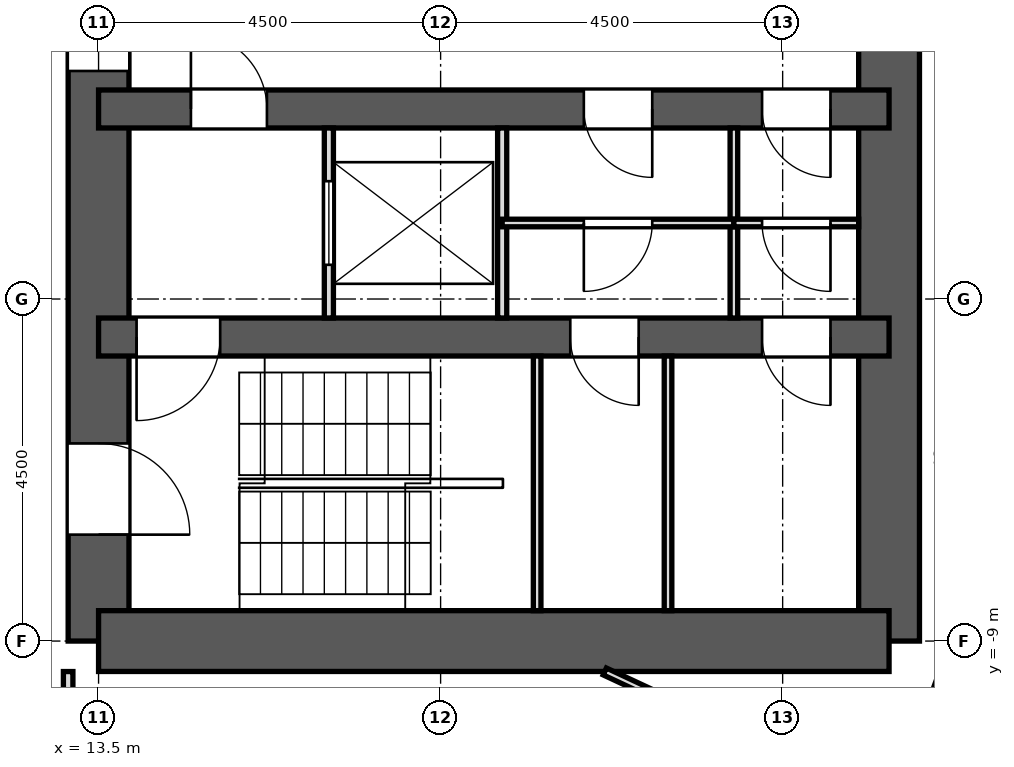
"""IFC4 building model, lengths in metres.
Left out: names, types, materials, properties, quantities, classifications, styles, units other than length and angle.
Written with IfcOpenShell. Run it as: python <this file> out.ifc"""

import sys

from ifc_helpers import new_model, si_unit, direction, frame, frame_2d, origin, place, context, subcontext, project, spatial, rectangle, extrude, element, fill, save


model = new_model("IFC4")
c1 = context("Model", 3, precision=1e-05, world=origin(), true_north=direction((0.0, 1.0)))
c2 = subcontext(c1, "Body", "Model", "MODEL_VIEW")
j1 = project(units=[si_unit("LENGTHUNIT", "METRE"), si_unit("PLANEANGLEUNIT", "RADIAN")], contexts=[c1])
p1 = place(None, origin())
s1 = spatial("IfcSite", under=j1, at=p1, CompositionType="ELEMENT")
p2 = place(p1, origin())
s2 = spatial("IfcBuilding", under=s1, at=p2, CompositionType="ELEMENT")
p3 = place(p2, frame((0.0, 0.0, 141.4)))
s3 = spatial("IfcBuildingStorey", under=s2, at=p3, CompositionType="ELEMENT", Elevation=141.4)
p4 = place(p3, frame((13.5, -9.0, 0.0), z_axis=(0.0, 0.0, 1.0), x_axis=(0.0, 1.0, 0.0)))
e1 = element("IfcWall", 1, at=p4, inside=s3, PredefinedType="SHEAR", context=c2, shape_type="SweptSolid", body=[
    extrude(rectangle(XDim=18.0, YDim=0.8, at=frame_2d((9.0, 0.0))), origin(), (0.0, 0.0, 1.0), 3.3),
])
p5 = place(p4, frame((15.4, 0.0, 0.0)))
e2 = element("IfcOpeningElement", 2, at=p5, cuts=e1, PredefinedType="OPENING", context=c2, shape_type="SweptSolid", body=[
    extrude(rectangle(XDim=1.2, YDim=2.1, at=frame_2d((0.6, 1.05))), frame((0.0, 0.412, 0.0), z_axis=(0.0, -1.0, 0.0), x_axis=(1.0, 0.0, 0.0)), (0.0, 0.0, 1.0), 0.824),
])
p6 = place(p4, frame((1.4, 0.0, 0.0)))
e3 = element("IfcOpeningElement", 3, at=p6, cuts=e1, PredefinedType="OPENING", context=c2, shape_type="SweptSolid", body=[
    extrude(rectangle(XDim=1.2, YDim=2.1, at=frame_2d((0.6, 1.05))), frame((0.0, 0.412, 0.0), z_axis=(0.0, -1.0, 0.0), x_axis=(1.0, 0.0, 0.0)), (0.0, 0.0, 1.0), 0.824),
])
p7 = place(p4, frame((7.5, 0.0, 0.0)))
e4 = element("IfcOpeningElement", 4, at=p7, cuts=e1, PredefinedType="OPENING", context=c2, shape_type="SweptSolid", body=[
    extrude(rectangle(XDim=3.0, YDim=2.4, at=frame_2d((1.5, 1.2))), frame((0.0, 0.412, 0.0), z_axis=(0.0, -1.0, 0.0), x_axis=(1.0, 0.0, 0.0)), (0.0, 0.0, 1.0), 0.824),
])
p8 = place(p3, frame((23.9, -9.0, 0.0), z_axis=(0.0, 0.0, 1.0), x_axis=(0.0, 1.0, 0.0)))
e5 = element("IfcWall", 5, at=p8, inside=s3, PredefinedType="SHEAR", context=c2, shape_type="SweptSolid", body=[
    extrude(rectangle(XDim=18.0, YDim=0.8, at=frame_2d((9.0, 0.0))), origin(), (0.0, 0.0, 1.0), 3.3),
])
p9 = place(p3, frame((13.5, -9.0, 0.0), z_axis=(0.0, 0.0, 1.0), x_axis=(1.0, 0.0, 0.0)))
e6 = element("IfcWall", 6, at=p9, inside=s3, PredefinedType="SHEAR", context=c2, shape_type="SweptSolid", body=[
    extrude(rectangle(XDim=10.4, YDim=0.8, at=frame_2d((5.2, 0.0))), origin(), (0.0, 0.0, 1.0), 3.3),
])
p10 = place(p3, frame((13.5, -5.0, 0.0), z_axis=(0.0, 0.0, 1.0), x_axis=(1.0, 0.0, 0.0)))
e7 = element("IfcWall", 7, at=p10, inside=s3, PredefinedType="SHEAR", context=c2, shape_type="SweptSolid", body=[
    extrude(rectangle(XDim=10.4, YDim=0.5, at=frame_2d((5.2, 0.0))), origin(), (0.0, 0.0, 1.0), 3.3),
])
p11 = place(p10, frame((6.206, 0.0, 0.0)))
e8 = element("IfcOpeningElement", 8, at=p11, cuts=e7, PredefinedType="OPENING", context=c2, shape_type="SweptSolid", body=[
    extrude(rectangle(XDim=0.9, YDim=2.1, at=frame_2d((0.45, 1.05))), frame((0.0, 0.262, 0.0), z_axis=(0.0, -1.0, 0.0), x_axis=(1.0, 0.0, 0.0)), (0.0, 0.0, 1.0), 0.524),
])
p12 = place(p10, frame((8.729, 0.0, 0.0)))
e9 = element("IfcOpeningElement", 9, at=p12, cuts=e7, PredefinedType="OPENING", context=c2, shape_type="SweptSolid", body=[
    extrude(rectangle(XDim=0.9, YDim=2.1, at=frame_2d((0.45, 1.05))), frame((0.0, 0.262, 0.0), z_axis=(0.0, -1.0, 0.0), x_axis=(1.0, 0.0, 0.0)), (0.0, 0.0, 1.0), 0.524),
])
p13 = place(p10, frame((0.5, 0.0, 0.0)))
e10 = element("IfcOpeningElement", 10, at=p13, cuts=e7, PredefinedType="OPENING", context=c2, shape_type="SweptSolid", body=[
    extrude(rectangle(XDim=1.1, YDim=2.1, at=frame_2d((0.55, 1.05))), frame((0.0, 0.262, 0.0), z_axis=(0.0, -1.0, 0.0), x_axis=(1.0, 0.0, 0.0)), (0.0, 0.0, 1.0), 0.524),
])
p14 = place(p3, frame((13.5, -2.0, 0.0), z_axis=(0.0, 0.0, 1.0), x_axis=(1.0, 0.0, 0.0)))
e11 = element("IfcWall", 11, at=p14, inside=s3, PredefinedType="SHEAR", context=c2, shape_type="SweptSolid", body=[
    extrude(rectangle(XDim=10.4, YDim=0.5, at=frame_2d((5.2, 0.0))), origin(), (0.0, 0.0, 1.0), 3.3),
])
p15 = place(p14, frame((1.215, 0.0, 0.0)))
e12 = element("IfcOpeningElement", 12, at=p15, cuts=e11, PredefinedType="OPENING", context=c2, shape_type="SweptSolid", body=[
    extrude(rectangle(XDim=1.0, YDim=2.1, at=frame_2d((0.5, 1.05))), frame((0.0, 0.262, 0.0), z_axis=(0.0, -1.0, 0.0), x_axis=(1.0, 0.0, 0.0)), (0.0, 0.0, 1.0), 0.524),
])
p16 = place(p14, frame((6.384, 0.0, 0.0)))
e13 = element("IfcOpeningElement", 13, at=p16, cuts=e11, PredefinedType="OPENING", context=c2, shape_type="SweptSolid", body=[
    extrude(rectangle(XDim=0.9, YDim=2.1, at=frame_2d((0.45, 1.05))), frame((0.0, 0.262, 0.0), z_axis=(0.0, -1.0, 0.0), x_axis=(1.0, 0.0, 0.0)), (0.0, 0.0, 1.0), 0.524),
])
p17 = place(p14, frame((8.729, 0.0, 0.0)))
e14 = element("IfcOpeningElement", 14, at=p17, cuts=e11, PredefinedType="OPENING", context=c2, shape_type="SweptSolid", body=[
    extrude(rectangle(XDim=0.9, YDim=2.1, at=frame_2d((0.45, 1.05))), frame((0.0, 0.262, 0.0), z_axis=(0.0, -1.0, 0.0), x_axis=(1.0, 0.0, 0.0)), (0.0, 0.0, 1.0), 0.524),
])
p18 = place(p3, frame((24.369, -10.811, 0.0), z_axis=(0.0, 0.0, 1.0), x_axis=(0.341990236633, 0.939703505393, 0.0)))
e15 = element("IfcWall", 15, at=p18, inside=s3, PredefinedType="SOLIDWALL", context=c2, shape_type="SweptSolid", body=[
    extrude(rectangle(XDim=3.648, YDim=0.6, at=frame_2d((1.824, 0.0))), origin(), (0.0, 0.0, 1.0), 2.8),
])
p19 = place(p3, frame((20.16, -9.4, 0.0), z_axis=(0.0, 0.0, 1.0), x_axis=(0.906121146584, -0.423018282954, 0.0)))
e16 = element("IfcWall", 16, at=p19, inside=s3, PredefinedType="PARTITIONING", context=c2, shape_type="SweptSolid", body=[
    extrude(rectangle(XDim=3.421, YDim=0.1, at=frame_2d((1.711, 0.0))), origin(), (0.0, 0.0, 1.0), 2.8),
])
p20 = place(p3, frame((13.1, -13.032, 0.0), z_axis=(0.0, 0.0, 1.0), x_axis=(0.0, 1.0, 0.0)))
e17 = element("IfcWall", 17, at=p20, inside=s3, PredefinedType="PARTITIONING", context=c2, shape_type="SweptSolid", body=[
    extrude(rectangle(XDim=3.632, YDim=0.125, at=frame_2d((1.816, 0.0))), origin(), (0.0, 0.0, 1.0), 2.8),
])
p21 = place(p20, frame((1.284, 0.0, 0.0)))
e18 = element("IfcOpeningElement", 18, at=p21, cuts=e17, PredefinedType="OPENING", context=c2, shape_type="SweptSolid", body=[
    extrude(rectangle(XDim=1.0, YDim=2.1, at=frame_2d((0.5, 1.05))), frame((0.0, 0.074, 0.0), z_axis=(0.0, -1.0, 0.0), x_axis=(1.0, 0.0, 0.0)), (0.0, 0.0, 1.0), 0.149),
])
p22 = place(p20, frame((2.435, 0.0, 0.0)))
e19 = element("IfcOpeningElement", 19, at=p22, cuts=e17, PredefinedType="OPENING", context=c2, shape_type="SweptSolid", body=[
    extrude(rectangle(XDim=0.9, YDim=2.1, at=frame_2d((0.45, 1.05))), frame((0.0, 0.074, 0.0), z_axis=(0.0, -1.0, 0.0), x_axis=(1.0, 0.0, 0.0)), (0.0, 0.0, 1.0), 0.149),
])
p23 = place(p3, frame((16.53, -4.75, 0.0), z_axis=(0.0, 0.0, 1.0), x_axis=(0.0, 1.0, 0.0)))
e20 = element("IfcWall", 20, at=p23, inside=s3, PredefinedType="PARTITIONING", context=c2, shape_type="SweptSolid", body=[
    extrude(rectangle(XDim=2.5, YDim=0.12, at=frame_2d((1.25, 0.0))), origin(), (0.0, 0.0, 1.0), 2.8),
])
p24 = place(p23, frame((0.7, 0.0, 0.0)))
e21 = element("IfcOpeningElement", 21, at=p24, cuts=e20, PredefinedType="OPENING", context=c2, shape_type="SweptSolid", body=[
    extrude(rectangle(XDim=1.1, YDim=2.1, at=frame_2d((0.55, 1.05))), frame((0.0, 0.072, 0.0), z_axis=(0.0, -1.0, 0.0), x_axis=(1.0, 0.0, 0.0)), (0.0, 0.0, 1.0), 0.144),
])
p25 = place(p3, frame((18.81, -4.75, 0.0), z_axis=(0.0, 0.0, 1.0), x_axis=(0.0, 1.0, 0.0)))
e22 = element("IfcWall", 22, at=p25, inside=s3, PredefinedType="PARTITIONING", context=c2, shape_type="SweptSolid", body=[
    extrude(rectangle(XDim=2.5, YDim=0.12, at=frame_2d((1.25, 0.0))), origin(), (0.0, 0.0, 1.0), 2.8),
])
p26 = place(p3, frame((21.858, -4.75, 0.0), z_axis=(0.0, 0.0, 1.0), x_axis=(0.0, 1.0, 0.0)))
e23 = element("IfcWall", 23, at=p26, inside=s3, PredefinedType="PARTITIONING", context=c2, shape_type="SweptSolid", body=[
    extrude(rectangle(XDim=2.5, YDim=0.1, at=frame_2d((1.25, 0.0))), origin(), (0.0, 0.0, 1.0), 2.8),
])
p27 = place(p3, frame((18.81, -3.5, 0.0), z_axis=(0.0, 0.0, 1.0), x_axis=(1.0, 0.0, 0.0)))
e24 = element("IfcWall", 24, at=p27, inside=s3, PredefinedType="PARTITIONING", context=c2, shape_type="SweptSolid", body=[
    extrude(rectangle(XDim=3.048, YDim=0.1, at=frame_2d((1.524, 0.0))), origin(), (0.0, 0.0, 1.0), 2.8),
])
p28 = place(p27, frame((1.074, 0.0, 0.0)))
e25 = element("IfcOpeningElement", 25, at=p28, cuts=e24, PredefinedType="OPENING", context=c2, shape_type="SweptSolid", body=[
    extrude(rectangle(XDim=0.9, YDim=2.1, at=frame_2d((0.45, 1.05))), frame((0.0, 0.062, 0.0), z_axis=(0.0, -1.0, 0.0), x_axis=(1.0, 0.0, 0.0)), (0.0, 0.0, 1.0), 0.124),
])
p29 = place(p3, frame((21.858, -3.5, 0.0), z_axis=(0.0, 0.0, 1.0), x_axis=(1.0, 0.0, 0.0)))
e26 = element("IfcWall", 26, at=p29, inside=s3, PredefinedType="PARTITIONING", context=c2, shape_type="SweptSolid", body=[
    extrude(rectangle(XDim=1.642, YDim=0.1, at=frame_2d((0.821, 0.0))), origin(), (0.0, 0.0, 1.0), 2.8),
])
p30 = place(p29, frame((0.371, 0.0, 0.0)))
e27 = element("IfcOpeningElement", 27, at=p30, cuts=e26, PredefinedType="OPENING", context=c2, shape_type="SweptSolid", body=[
    extrude(rectangle(XDim=0.9, YDim=2.1, at=frame_2d((0.45, 1.05))), frame((0.0, 0.062, 0.0), z_axis=(0.0, -1.0, 0.0), x_axis=(1.0, 0.0, 0.0)), (0.0, 0.0, 1.0), 0.124),
])
for number, where, z_axis, x_axis in (
    (28, (19.27, -8.6, 0.0), (0.0, 0.0, 1.0), (0.0, 1.0, 0.0)),
    (29, (20.992, -8.6, 0.0), (0.0, 0.0, 1.0), (0.0, 1.0, 0.0)),
):
    element("IfcWall", number, at=place(p3, frame(where, z_axis=z_axis, x_axis=x_axis)), inside=s3, PredefinedType="PARTITIONING", context=c2, shape_type="SweptSolid", body=[
        extrude(rectangle(XDim=3.35, YDim=0.1, at=frame_2d((1.675, 0.0))), origin(), (0.0, 0.0, 1.0), 2.8),
    ])
p31 = place(p24, origin())
e30 = element("IfcDoor", 30, at=p31, inside=s3, OperationType="DOUBLE_DOOR_SLIDING", PredefinedType="DOOR", context=c2, shape_type="SweptSolid", body=[
    extrude(rectangle(XDim=1.1, YDim=2.1, at=frame_2d((0.55, 1.05))), frame((0.0, 0.025, 0.0), z_axis=(0.0, -1.0, 0.0), x_axis=(1.0, 0.0, 0.0)), (0.0, 0.0, 1.0), 0.05),
])
fill(e21, e30)
p32 = place(p15, origin())
e31 = element("IfcDoor", 31, at=p32, inside=s3, OperationType="SINGLE_SWING_LEFT", PredefinedType="DOOR", context=c2, shape_type="SweptSolid", body=[
    extrude(rectangle(XDim=1.0, YDim=2.1, at=frame_2d((0.5, 1.05))), frame((0.0, 0.025, 0.0), z_axis=(0.0, -1.0, 0.0), x_axis=(1.0, 0.0, 0.0)), (0.0, 0.0, 1.0), 0.05),
])
fill(e12, e31)
p33 = place(p16, frame((0.9, 0.0, 0.0), z_axis=(0.0, 0.0, 1.0), x_axis=(-1.0, 0.0, 0.0)))
e32 = element("IfcDoor", 32, at=p33, inside=s3, OperationType="SINGLE_SWING_LEFT", PredefinedType="DOOR", context=c2, shape_type="SweptSolid", body=[
    extrude(rectangle(XDim=0.9, YDim=2.1, at=frame_2d((0.45, 1.05))), frame((0.0, 0.025, 0.0), z_axis=(0.0, -1.0, 0.0), x_axis=(1.0, 0.0, 0.0)), (0.0, 0.0, 1.0), 0.05),
])
fill(e13, e32)
p34 = place(p17, frame((0.9, 0.0, 0.0), z_axis=(0.0, 0.0, 1.0), x_axis=(-1.0, 0.0, 0.0)))
e33 = element("IfcDoor", 33, at=p34, inside=s3, OperationType="SINGLE_SWING_LEFT", PredefinedType="DOOR", context=c2, shape_type="SweptSolid", body=[
    extrude(rectangle(XDim=0.9, YDim=2.1, at=frame_2d((0.45, 1.05))), frame((0.0, 0.025, 0.0), z_axis=(0.0, -1.0, 0.0), x_axis=(1.0, 0.0, 0.0)), (0.0, 0.0, 1.0), 0.05),
])
fill(e14, e33)
p35 = place(p30, frame((0.9, 0.0, 0.0), z_axis=(0.0, 0.0, 1.0), x_axis=(-1.0, 0.0, 0.0)))
e34 = element("IfcDoor", 34, at=p35, inside=s3, OperationType="SINGLE_SWING_LEFT", PredefinedType="DOOR", context=c2, shape_type="SweptSolid", body=[
    extrude(rectangle(XDim=0.9, YDim=2.1, at=frame_2d((0.45, 1.05))), frame((0.0, 0.025, 0.0), z_axis=(0.0, -1.0, 0.0), x_axis=(1.0, 0.0, 0.0)), (0.0, 0.0, 1.0), 0.05),
])
fill(e27, e34)
p36 = place(p28, frame((0.9, 0.0, 0.0), z_axis=(0.0, 0.0, 1.0), x_axis=(-1.0, 0.0, 0.0)))
e35 = element("IfcDoor", 35, at=p36, inside=s3, OperationType="SINGLE_SWING_RIGHT", PredefinedType="DOOR", context=c2, shape_type="SweptSolid", body=[
    extrude(rectangle(XDim=0.9, YDim=2.1, at=frame_2d((0.45, 1.05))), frame((0.0, 0.025, 0.0), z_axis=(0.0, -1.0, 0.0), x_axis=(1.0, 0.0, 0.0)), (0.0, 0.0, 1.0), 0.05),
])
fill(e25, e35)
p37 = place(p11, frame((0.9, 0.0, 0.0), z_axis=(0.0, 0.0, 1.0), x_axis=(-1.0, 0.0, 0.0)))
e36 = element("IfcDoor", 36, at=p37, inside=s3, OperationType="SINGLE_SWING_LEFT", PredefinedType="DOOR", context=c2, shape_type="SweptSolid", body=[
    extrude(rectangle(XDim=0.9, YDim=2.1, at=frame_2d((0.45, 1.05))), frame((0.0, 0.025, 0.0), z_axis=(0.0, -1.0, 0.0), x_axis=(1.0, 0.0, 0.0)), (0.0, 0.0, 1.0), 0.05),
])
fill(e8, e36)
p38 = place(p12, frame((0.9, 0.0, 0.0), z_axis=(0.0, 0.0, 1.0), x_axis=(-1.0, 0.0, 0.0)))
e37 = element("IfcDoor", 37, at=p38, inside=s3, OperationType="SINGLE_SWING_LEFT", PredefinedType="DOOR", context=c2, shape_type="SweptSolid", body=[
    extrude(rectangle(XDim=0.9, YDim=2.1, at=frame_2d((0.45, 1.05))), frame((0.0, 0.025, 0.0), z_axis=(0.0, -1.0, 0.0), x_axis=(1.0, 0.0, 0.0)), (0.0, 0.0, 1.0), 0.05),
])
fill(e9, e37)
p39 = place(p13, frame((1.1, 0.0, 0.0), z_axis=(0.0, 0.0, 1.0), x_axis=(-1.0, 0.0, 0.0)))
e38 = element("IfcDoor", 38, at=p39, inside=s3, OperationType="SINGLE_SWING_RIGHT", PredefinedType="DOOR", context=c2, shape_type="SweptSolid", body=[
    extrude(rectangle(XDim=1.1, YDim=2.1, at=frame_2d((0.55, 1.05))), frame((0.0, 0.025, 0.0), z_axis=(0.0, -1.0, 0.0), x_axis=(1.0, 0.0, 0.0)), (0.0, 0.0, 1.0), 0.05),
])
fill(e10, e38)
p40 = place(p6, frame((1.2, 0.0, 0.0), z_axis=(0.0, 0.0, 1.0), x_axis=(-1.0, 0.0, 0.0)))
e39 = element("IfcDoor", 39, at=p40, inside=s3, OperationType="SINGLE_SWING_RIGHT", PredefinedType="DOOR", context=c2, shape_type="SweptSolid", body=[
    extrude(rectangle(XDim=1.2, YDim=2.1, at=frame_2d((0.6, 1.05))), frame((0.0, 0.025, 0.0), z_axis=(0.0, -1.0, 0.0), x_axis=(1.0, 0.0, 0.0)), (0.0, 0.0, 1.0), 0.05),
])
fill(e3, e39)
p41 = place(p7, origin())
e40 = element("IfcDoor", 40, at=p41, inside=s3, OperationType="DOUBLE_DOOR_SLIDING", PredefinedType="DOOR", context=c2, shape_type="SweptSolid", body=[
    extrude(rectangle(XDim=3.0, YDim=2.4, at=frame_2d((1.5, 1.2))), frame((0.0, 0.025, 0.0), z_axis=(0.0, -1.0, 0.0), x_axis=(1.0, 0.0, 0.0)), (0.0, 0.0, 1.0), 0.05),
])
fill(e4, e40)
save(model, sys.argv[1])
